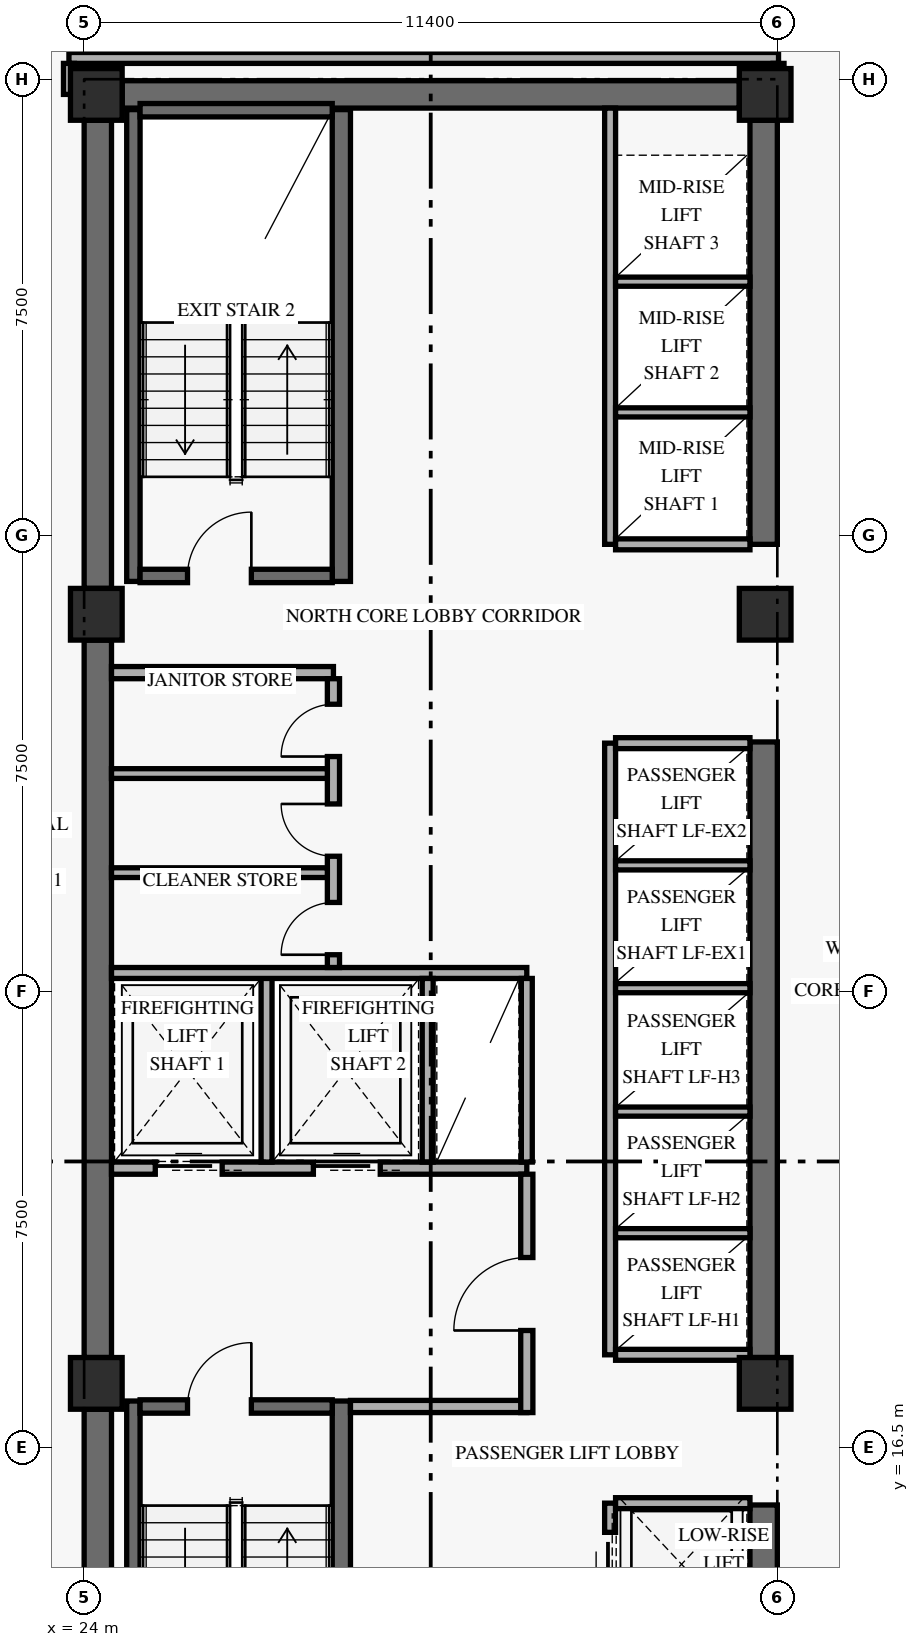
"""IFC4 building model, lengths in metres.
Left out: names, types, materials, properties, quantities, classifications, styles, units other than length and angle.
Written with IfcOpenShell. Run it as: python <this file> out.ifc"""

import sys

from ifc_helpers import new_model, si_unit, direction, frame, frame_2d, origin, origin_2d, place, context, subcontext, project, spatial, rectangle, extrude, element, fill, save


model = new_model("IFC4")
c1 = context("Model", 3, precision=1e-05, world=origin(), true_north=direction((0.0, 1.0)))
c2 = subcontext(c1, "Body", "Model", "MODEL_VIEW")
j1 = project(units=[si_unit("LENGTHUNIT", "METRE"), si_unit("PLANEANGLEUNIT", "RADIAN")], contexts=[c1])
p1 = place(None, origin())
s1 = spatial("IfcSite", under=j1, at=p1, CompositionType="ELEMENT")
p2 = place(p1, origin())
s2 = spatial("IfcBuilding", under=s1, at=p2, CompositionType="ELEMENT")
p3 = place(p2, frame((0.0, 0.0, 80.4)))
s3 = spatial("IfcBuildingStorey", under=s2, at=p3, CompositionType="ELEMENT", Elevation=80.4)
p4 = place(p3, frame((24.225, 9.675, 0.0), z_axis=(0.0, 0.0, 1.0), x_axis=(0.0, 1.0, 0.0)))
e1 = element("IfcWall", 1, at=p4, inside=s3, PredefinedType="SHEAR", context=c2, shape_type="SweptSolid", body=[
    extrude(rectangle(XDim=7.45, YDim=0.45, at=frame_2d((3.725, 0.0))), origin(), (0.0, 0.0, 1.0), 2.749),
])
p5 = place(p3, frame((24.225, 17.975, 0.0), z_axis=(0.0, 0.0, 1.0), x_axis=(0.0, 1.0, 0.0)))
e2 = element("IfcWall", 2, at=p5, inside=s3, PredefinedType="SHEAR", context=c2, shape_type="SweptSolid", body=[
    extrude(rectangle(XDim=11.8, YDim=0.45, at=frame_2d((5.9, 0.0))), origin(), (0.0, 0.0, 1.0), 2.749),
])
p6 = place(p3, frame((24.225, 30.625, 0.0), z_axis=(0.0, 0.0, 1.0), x_axis=(0.0, 1.0, 0.0)))
e3 = element("IfcWall", 3, at=p6, inside=s3, PredefinedType="SHEAR", context=c2, shape_type="SweptSolid", body=[
    extrude(rectangle(XDim=7.7, YDim=0.45, at=frame_2d((3.85, 0.0))), origin(), (0.0, 0.0, 1.0), 2.749),
])
p7 = place(p3, frame((35.175, 9.675, 0.0), z_axis=(0.0, 0.0, 1.0), x_axis=(0.0, 1.0, 0.0)))
e4 = element("IfcWall", 4, at=p7, inside=s3, PredefinedType="SHEAR", context=c2, shape_type="SweptSolid", body=[
    extrude(rectangle(XDim=5.875, YDim=0.45, at=frame_2d((2.938, 0.0))), origin(), (0.0, 0.0, 1.0), 2.749),
])
p8 = place(p3, frame((35.175, 17.975, 0.0), z_axis=(0.0, 0.0, 1.0), x_axis=(0.0, 1.0, 0.0)))
e5 = element("IfcWall", 5, at=p8, inside=s3, PredefinedType="SHEAR", context=c2, shape_type="SweptSolid", body=[
    extrude(rectangle(XDim=10.125, YDim=0.45, at=frame_2d((5.062, 0.0))), origin(), (0.0, 0.0, 1.0), 2.749),
])
p9 = place(p3, frame((35.175, 31.35, 0.0), z_axis=(0.0, 0.0, 1.0), x_axis=(0.0, 1.0, 0.0)))
e6 = element("IfcWall", 6, at=p9, inside=s3, PredefinedType="SHEAR", context=c2, shape_type="SweptSolid", body=[
    extrude(rectangle(XDim=6.975, YDim=0.45, at=frame_2d((3.487, 0.0))), origin(), (0.0, 0.0, 1.0), 2.749),
])
p10 = place(p3, frame((24.625, 38.75, 0.0), z_axis=(0.0, 0.0, 1.0), x_axis=(1.0, 0.0, 0.0)))
e7 = element("IfcWall", 7, at=p10, inside=s3, PredefinedType="SHEAR", context=c2, shape_type="SweptSolid", body=[
    extrude(rectangle(XDim=10.15, YDim=0.45, at=frame_2d((5.075, 0.0))), origin(), (0.0, 0.0, 1.0), 3.36),
])
p11 = place(p3, frame((24.81, 9.5, 0.0), z_axis=(0.0, 0.0, 1.0), x_axis=(0.0, 1.0, 0.0)))
e8 = element("IfcWall", 8, at=p11, inside=s3, PredefinedType="SHEAR", context=c2, shape_type="SweptSolid", body=[
    extrude(rectangle(XDim=7.76, YDim=0.22, at=frame_2d((3.88, 0.0))), origin(), (0.0, 0.0, 1.0), 3.36),
])
p12 = place(p3, frame((28.23, 9.5, 0.0), z_axis=(0.0, 0.0, 1.0), x_axis=(0.0, 1.0, 0.0)))
e9 = element("IfcWall", 9, at=p12, inside=s3, PredefinedType="SHEAR", context=c2, shape_type="SweptSolid", body=[
    extrude(rectangle(XDim=7.76, YDim=0.3, at=frame_2d((3.88, 0.0))), origin(), (0.0, 0.0, 1.0), 3.36),
])
p13 = place(p3, frame((24.92, 17.17, 0.0), z_axis=(0.0, 0.0, 1.0), x_axis=(1.0, 0.0, 0.0)))
e10 = element("IfcWall", 10, at=p13, inside=s3, PredefinedType="SHEAR", context=c2, shape_type="SweptSolid", body=[
    extrude(rectangle(XDim=3.16, YDim=0.22, at=frame_2d((1.58, 0.0))), origin(), (0.0, 0.0, 1.0), 3.36),
])
p14 = place(p13, frame((0.78, 0.0, 0.0)))
e11 = element("IfcOpeningElement", 11, at=p14, cuts=e10, PredefinedType="OPENING", context=c2, shape_type="SweptSolid", body=[
    extrude(rectangle(XDim=1.05, YDim=2.15, at=frame_2d((0.525, 1.075))), frame((0.0, 0.12, 0.0), z_axis=(0.0, -1.0, 0.0), x_axis=(1.0, 0.0, 0.0)), (0.0, 0.0, 1.0), 0.24),
])
p15 = place(p3, frame((24.81, 30.74, 0.0), z_axis=(0.0, 0.0, 1.0), x_axis=(0.0, 1.0, 0.0)))
e12 = element("IfcWall", 12, at=p15, inside=s3, PredefinedType="SHEAR", context=c2, shape_type="SweptSolid", body=[
    extrude(rectangle(XDim=7.76, YDim=0.22, at=frame_2d((3.88, 0.0))), origin(), (0.0, 0.0, 1.0), 3.36),
])
p16 = place(p3, frame((28.23, 30.74, 0.0), z_axis=(0.0, 0.0, 1.0), x_axis=(0.0, 1.0, 0.0)))
e13 = element("IfcWall", 13, at=p16, inside=s3, PredefinedType="SHEAR", context=c2, shape_type="SweptSolid", body=[
    extrude(rectangle(XDim=7.76, YDim=0.3, at=frame_2d((3.88, 0.0))), origin(), (0.0, 0.0, 1.0), 3.36),
])
p17 = place(p3, frame((24.92, 30.83, 0.0), z_axis=(0.0, 0.0, 1.0), x_axis=(1.0, 0.0, 0.0)))
e14 = element("IfcWall", 14, at=p17, inside=s3, PredefinedType="SHEAR", context=c2, shape_type="SweptSolid", body=[
    extrude(rectangle(XDim=3.16, YDim=0.22, at=frame_2d((1.58, 0.0))), origin(), (0.0, 0.0, 1.0), 3.36),
])
p18 = place(p17, frame((0.78, 0.0, 0.0)))
e15 = element("IfcOpeningElement", 15, at=p18, cuts=e14, PredefinedType="OPENING", context=c2, shape_type="SweptSolid", body=[
    extrude(rectangle(XDim=1.05, YDim=2.15, at=frame_2d((0.525, 1.075))), frame((0.0, 0.12, 0.0), z_axis=(0.0, -1.0, 0.0), x_axis=(1.0, 0.0, 0.0)), (0.0, 0.0, 1.0), 0.24),
])
p19 = place(p3, frame((24.92, 38.49, 0.0), z_axis=(0.0, 0.0, 1.0), x_axis=(1.0, 0.0, 0.0)))
e16 = element("IfcWall", 16, at=p19, inside=s3, PredefinedType="SHEAR", context=c2, shape_type="SweptSolid", body=[
    extrude(rectangle(XDim=3.16, YDim=0.22, at=frame_2d((1.58, 0.0))), origin(), (0.0, 0.0, 1.0), 3.36),
])
for number, where, z_axis, x_axis in (
    (17, (24.2, 17.55, 0.0), (0.0, 0.0, 1.0), (1.0, 0.0, 0.0)),
    (18, (24.2, 30.2, 0.0), (0.0, 0.0, 1.0), (1.0, 0.0, 0.0)),
    (19, (24.2, 38.75, 0.0), (0.0, 0.0, 1.0), (1.0, 0.0, 0.0)),
    (20, (35.2, 17.55, 0.0), (0.0, 0.0, 1.0), (1.0, 0.0, 0.0)),
    (21, (35.2, 30.2, 0.0), (0.0, 0.0, 1.0), (1.0, 0.0, 0.0)),
    (22, (35.2, 38.75, 0.0), (0.0, 0.0, 1.0), (1.0, 0.0, 0.0)),
):
    element("IfcColumn", number, at=place(p3, frame(where, z_axis=z_axis, x_axis=x_axis)), inside=s3, PredefinedType="COLUMN", context=c2, shape_type="SweptSolid", body=[
        extrude(rectangle(XDim=0.85, YDim=0.85, at=origin_2d()), origin(), (0.0, 0.0, 1.0), 3.6),
    ])
p20 = place(p3, frame((24.45, 21.09, 0.0), z_axis=(0.0, 0.0, 1.0), x_axis=(1.0, 0.0, 0.0)))
e23 = element("IfcWall", 23, at=p20, inside=s3, PredefinedType="STANDARD", context=c2, shape_type="SweptSolid", body=[
    extrude(rectangle(XDim=6.83, YDim=0.2, at=frame_2d((3.415, 0.0))), origin(), (0.0, 0.0, 1.0), 3.36),
])
p21 = place(p20, frame((0.72, 0.0, 0.0)))
e24 = element("IfcOpeningElement", 24, at=p21, cuts=e23, PredefinedType="OPENING", context=c2, shape_type="SweptSolid", body=[
    extrude(rectangle(XDim=1.1, YDim=2.2, at=frame_2d((0.55, 1.1))), frame((0.0, 0.11, 0.0), z_axis=(0.0, -1.0, 0.0), x_axis=(1.0, 0.0, 0.0)), (0.0, 0.0, 1.0), 0.22),
])
p22 = place(p20, frame((3.32, 0.0, 0.0)))
e25 = element("IfcOpeningElement", 25, at=p22, cuts=e23, PredefinedType="OPENING", context=c2, shape_type="SweptSolid", body=[
    extrude(rectangle(XDim=1.1, YDim=2.2, at=frame_2d((0.55, 1.1))), frame((0.0, 0.11, 0.0), z_axis=(0.0, -1.0, 0.0), x_axis=(1.0, 0.0, 0.0)), (0.0, 0.0, 1.0), 0.22),
])
p23 = place(p3, frame((28.38, 17.17, 0.0), z_axis=(0.0, 0.0, 1.0), x_axis=(1.0, 0.0, 0.0)))
e26 = element("IfcWall", 26, at=p23, inside=s3, PredefinedType="STANDARD", context=c2, shape_type="SweptSolid", body=[
    extrude(rectangle(XDim=2.9, YDim=0.2, at=frame_2d((1.45, 0.0))), origin(), (0.0, 0.0, 1.0), 3.36),
])
p24 = place(p3, frame((31.28, 17.07, 0.0), z_axis=(0.0, 0.0, 1.0), x_axis=(0.0, 1.0, 0.0)))
e27 = element("IfcWall", 27, at=p24, inside=s3, PredefinedType="STANDARD", context=c2, shape_type="SweptSolid", body=[
    extrude(rectangle(XDim=3.92, YDim=0.2, at=frame_2d((1.96, 0.0))), origin(), (0.0, 0.0, 1.0), 2.731),
])
p25 = place(p24, frame((1.35, 0.0, 0.0)))
e28 = element("IfcOpeningElement", 28, at=p25, cuts=e27, PredefinedType="OPENING", context=c2, shape_type="SweptSolid", body=[
    extrude(rectangle(XDim=1.2, YDim=2.15, at=frame_2d((0.6, 1.075))), frame((0.0, 0.11, 0.0), z_axis=(0.0, -1.0, 0.0), x_axis=(1.0, 0.0, 0.0)), (0.0, 0.0, 1.0), 0.22),
])
p26 = place(p3, frame((27.0, 21.19, 0.0), z_axis=(0.0, 0.0, 1.0), x_axis=(0.0, 1.0, 0.0)))
e29 = element("IfcWall", 29, at=p26, inside=s3, PredefinedType="STANDARD", context=c2, shape_type="SweptSolid", body=[
    extrude(rectangle(XDim=3.11, YDim=0.18, at=frame_2d((1.555, 0.0))), origin(), (0.0, 0.0, 1.0), 3.36),
])
p27 = place(p3, frame((24.45, 24.3, 0.0), z_axis=(0.0, 0.0, 1.0), x_axis=(1.0, 0.0, 0.0)))
e30 = element("IfcWall", 30, at=p27, inside=s3, PredefinedType="STANDARD", context=c2, shape_type="SweptSolid", body=[
    extrude(rectangle(XDim=6.83, YDim=0.18, at=frame_2d((3.415, 0.0))), origin(), (0.0, 0.0, 1.0), 3.36),
])
for number, where, z_axis, x_axis in (
    (31, (29.65, 21.19, 0.0), (0.0, 0.0, 1.0), (0.0, 1.0, 0.0)),
    (32, (31.28, 21.19, 0.0), (0.0, 0.0, 1.0), (0.0, 1.0, 0.0)),
):
    element("IfcWall", number, at=place(p3, frame(where, z_axis=z_axis, x_axis=x_axis)), inside=s3, PredefinedType="STANDARD", context=c2, shape_type="SweptSolid", body=[
        extrude(rectangle(XDim=3.02, YDim=0.18, at=frame_2d((1.51, 0.0))), origin(), (0.0, 0.0, 1.0), 3.36),
    ])
p28 = place(p3, frame((24.45, 29.24, 0.0), z_axis=(0.0, 0.0, 1.0), x_axis=(1.0, 0.0, 0.0)))
e33 = element("IfcWall", 33, at=p28, inside=s3, PredefinedType="STANDARD", context=c2, shape_type="SweptSolid", body=[
    extrude(rectangle(XDim=3.65, YDim=0.2, at=frame_2d((1.825, 0.0))), origin(), (0.0, 0.0, 1.0), 3.36),
])
p29 = place(p3, frame((28.1, 24.39, 0.0), z_axis=(0.0, 0.0, 1.0), x_axis=(0.0, 1.0, 0.0)))
e34 = element("IfcWall", 34, at=p29, inside=s3, PredefinedType="STANDARD", context=c2, shape_type="SweptSolid", body=[
    extrude(rectangle(XDim=4.75, YDim=0.2, at=frame_2d((2.375, 0.0))), origin(), (0.0, 0.0, 1.0), 3.36),
])
p30 = place(p29, frame((0.21, 0.0, 0.0)))
e35 = element("IfcOpeningElement", 35, at=p30, cuts=e34, PredefinedType="OPENING", context=c2, shape_type="SweptSolid", body=[
    extrude(rectangle(XDim=0.86, YDim=2.1, at=frame_2d((0.43, 1.05))), frame((0.0, 0.11, 0.0), z_axis=(0.0, -1.0, 0.0), x_axis=(1.0, 0.0, 0.0)), (0.0, 0.0, 1.0), 0.22),
])
p31 = place(p29, frame((1.83, 0.0, 0.0)))
e36 = element("IfcOpeningElement", 36, at=p31, cuts=e34, PredefinedType="OPENING", context=c2, shape_type="SweptSolid", body=[
    extrude(rectangle(XDim=0.86, YDim=2.1, at=frame_2d((0.43, 1.05))), frame((0.0, 0.11, 0.0), z_axis=(0.0, -1.0, 0.0), x_axis=(1.0, 0.0, 0.0)), (0.0, 0.0, 1.0), 0.22),
])
p32 = place(p29, frame((3.47, 0.0, 0.0)))
e37 = element("IfcOpeningElement", 37, at=p32, cuts=e34, PredefinedType="OPENING", context=c2, shape_type="SweptSolid", body=[
    extrude(rectangle(XDim=0.86, YDim=2.1, at=frame_2d((0.43, 1.05))), frame((0.0, 0.11, 0.0), z_axis=(0.0, -1.0, 0.0), x_axis=(1.0, 0.0, 0.0)), (0.0, 0.0, 1.0), 0.22),
])
for number, where, z_axis, x_axis in (
    (38, (24.45, 25.95, 0.0), (0.0, 0.0, 1.0), (1.0, 0.0, 0.0)),
    (39, (24.45, 27.58, 0.0), (0.0, 0.0, 1.0), (1.0, 0.0, 0.0)),
):
    element("IfcWall", number, at=place(p3, frame(where, z_axis=z_axis, x_axis=x_axis)), inside=s3, PredefinedType="PARTITIONING", context=c2, shape_type="SweptSolid", body=[
        extrude(rectangle(XDim=3.55, YDim=0.16, at=frame_2d((1.775, 0.0))), origin(), (0.0, 0.0, 1.0), 3.36),
    ])
p33 = place(p3, frame((32.65, 9.5, 0.0), z_axis=(0.0, 0.0, 1.0), x_axis=(0.0, 1.0, 0.0)))
e40 = element("IfcWall", 40, at=p33, inside=s3, PredefinedType="STANDARD", context=c2, shape_type="SweptSolid", body=[
    extrude(rectangle(XDim=6.08, YDim=0.18, at=frame_2d((3.04, 0.0))), origin(), (0.0, 0.0, 1.0), 3.36),
])
p34 = place(p33, frame((0.55, 0.0, 0.0)))
e41 = element("IfcOpeningElement", 41, at=p34, cuts=e40, PredefinedType="OPENING", context=c2, shape_type="SweptSolid", body=[
    extrude(rectangle(XDim=1.05, YDim=2.2, at=frame_2d((0.525, 1.1))), frame((0.0, 0.1, 0.0), z_axis=(0.0, -1.0, 0.0), x_axis=(1.0, 0.0, 0.0)), (0.0, 0.0, 1.0), 0.2),
])
p35 = place(p33, frame((2.55, 0.0, 0.0)))
e42 = element("IfcOpeningElement", 42, at=p35, cuts=e40, PredefinedType="OPENING", context=c2, shape_type="SweptSolid", body=[
    extrude(rectangle(XDim=1.05, YDim=2.2, at=frame_2d((0.525, 1.1))), frame((0.0, 0.1, 0.0), z_axis=(0.0, -1.0, 0.0), x_axis=(1.0, 0.0, 0.0)), (0.0, 0.0, 1.0), 0.2),
])
p36 = place(p33, frame((4.55, 0.0, 0.0)))
e43 = element("IfcOpeningElement", 43, at=p36, cuts=e40, PredefinedType="OPENING", context=c2, shape_type="SweptSolid", body=[
    extrude(rectangle(XDim=1.05, YDim=2.2, at=frame_2d((0.525, 1.1))), frame((0.0, 0.1, 0.0), z_axis=(0.0, -1.0, 0.0), x_axis=(1.0, 0.0, 0.0)), (0.0, 0.0, 1.0), 0.2),
])
p37 = place(p3, frame((32.74, 15.58, 0.0), z_axis=(0.0, 0.0, 1.0), x_axis=(1.0, 0.0, 0.0)))
e44 = element("IfcWall", 44, at=p37, inside=s3, PredefinedType="STANDARD", context=c2, shape_type="SweptSolid", body=[
    extrude(rectangle(XDim=2.21, YDim=0.18, at=frame_2d((1.105, 0.0))), origin(), (0.0, 0.0, 1.0), 3.36),
])
p38 = place(p3, frame((32.65, 18.02, 0.0), z_axis=(0.0, 0.0, 1.0), x_axis=(0.0, 1.0, 0.0)))
e45 = element("IfcWall", 45, at=p38, inside=s3, PredefinedType="STANDARD", context=c2, shape_type="SweptSolid", body=[
    extrude(rectangle(XDim=10.06, YDim=0.18, at=frame_2d((5.03, 0.0))), origin(), (0.0, 0.0, 1.0), 3.36),
])
for number, where, z_axis, x_axis in (
    (46, (32.74, 18.02, 0.0), (0.0, 0.0, 1.0), (1.0, 0.0, 0.0)),
    (47, (32.74, 28.08, 0.0), (0.0, 0.0, 1.0), (1.0, 0.0, 0.0)),
):
    element("IfcWall", number, at=place(p3, frame(where, z_axis=z_axis, x_axis=x_axis)), inside=s3, PredefinedType="STANDARD", context=c2, shape_type="SweptSolid", body=[
        extrude(rectangle(XDim=2.21, YDim=0.18, at=frame_2d((1.105, 0.0))), origin(), (0.0, 0.0, 1.0), 3.36),
    ])
for number, where, z_axis, x_axis in (
    (48, (32.74, 20.02, 0.0), (0.0, 0.0, 1.0), (1.0, 0.0, 0.0)),
    (49, (32.74, 22.02, 0.0), (0.0, 0.0, 1.0), (1.0, 0.0, 0.0)),
    (50, (32.74, 24.05, 0.0), (0.0, 0.0, 1.0), (1.0, 0.0, 0.0)),
    (51, (32.74, 26.07, 0.0), (0.0, 0.0, 1.0), (1.0, 0.0, 0.0)),
):
    element("IfcWall", number, at=place(p3, frame(where, z_axis=z_axis, x_axis=x_axis)), inside=s3, PredefinedType="STANDARD", context=c2, shape_type="SweptSolid", body=[
        extrude(rectangle(XDim=2.21, YDim=0.15, at=frame_2d((1.105, 0.0))), origin(), (0.0, 0.0, 1.0), 3.36),
    ])
p39 = place(p3, frame((32.65, 31.35, 0.0), z_axis=(0.0, 0.0, 1.0), x_axis=(0.0, 1.0, 0.0)))
e52 = element("IfcWall", 52, at=p39, inside=s3, PredefinedType="STANDARD", context=c2, shape_type="SweptSolid", body=[
    extrude(rectangle(XDim=7.175, YDim=0.18, at=frame_2d((3.587, 0.0))), origin(), (0.0, 0.0, 1.0), 3.36),
])
p40 = place(p3, frame((32.74, 31.35, 0.0), z_axis=(0.0, 0.0, 1.0), x_axis=(1.0, 0.0, 0.0)))
e53 = element("IfcWall", 53, at=p40, inside=s3, PredefinedType="STANDARD", context=c2, shape_type="SweptSolid", body=[
    extrude(rectangle(XDim=2.21, YDim=0.18, at=frame_2d((1.105, 0.0))), origin(), (0.0, 0.0, 1.0), 3.36),
])
for number, where, z_axis, x_axis in (
    (54, (32.74, 33.52, 0.0), (0.0, 0.0, 1.0), (1.0, 0.0, 0.0)),
    (55, (32.74, 35.67, 0.0), (0.0, 0.0, 1.0), (1.0, 0.0, 0.0)),
):
    element("IfcWall", number, at=place(p3, frame(where, z_axis=z_axis, x_axis=x_axis)), inside=s3, PredefinedType="STANDARD", context=c2, shape_type="SweptSolid", body=[
        extrude(rectangle(XDim=2.21, YDim=0.15, at=frame_2d((1.105, 0.0))), origin(), (0.0, 0.0, 1.0), 3.36),
    ])
p41 = place(p3, frame((23.75, 39.35, 0.0), z_axis=(0.0, 0.0, 1.0), x_axis=(1.0, 0.0, 0.0)))
e56 = element("IfcWall", 56, at=p41, inside=s3, PredefinedType="STANDARD", context=c2, shape_type="SweptSolid", body=[
    extrude(rectangle(XDim=11.67, YDim=0.18, at=frame_2d((5.835, 0.0))), origin(), (0.0, 0.0, 1.0), 2.731),
])
for number, where, z_axis, x_axis in (
    (57, (35.42, 38.75, 0.0), (0.0, 0.0, 1.0), (0.0, 1.0, 0.0)),
    (58, (23.75, 38.75, 0.0), (0.0, 0.0, 1.0), (0.0, 1.0, 0.0)),
):
    element("IfcWall", number, at=place(p3, frame(where, z_axis=z_axis, x_axis=x_axis)), inside=s3, PredefinedType="STANDARD", context=c2, shape_type="SweptSolid", body=[
        extrude(rectangle(XDim=0.51, YDim=0.18, at=frame_2d((0.255, 0.0))), origin(), (0.0, 0.0, 1.0), 2.731),
    ])
p42 = place(p14, frame((1.05, 0.0, 0.0), z_axis=(0.0, 0.0, 1.0), x_axis=(-1.0, 0.0, 0.0)))
e59 = element("IfcDoor", 59, at=p42, inside=s3, OperationType="SINGLE_SWING_LEFT", PredefinedType="DOOR", context=c2, shape_type="SweptSolid", body=[
    extrude(rectangle(XDim=1.05, YDim=2.15, at=frame_2d((0.525, 1.075))), frame((0.0, 0.025, 0.0), z_axis=(0.0, -1.0, 0.0), x_axis=(1.0, 0.0, 0.0)), (0.0, 0.0, 1.0), 0.05),
])
fill(e11, e59)
p43 = place(p18, origin())
e60 = element("IfcDoor", 60, at=p43, inside=s3, OperationType="SINGLE_SWING_RIGHT", PredefinedType="DOOR", context=c2, shape_type="SweptSolid", body=[
    extrude(rectangle(XDim=1.05, YDim=2.15, at=frame_2d((0.525, 1.075))), frame((0.0, 0.025, 0.0), z_axis=(0.0, -1.0, 0.0), x_axis=(1.0, 0.0, 0.0)), (0.0, 0.0, 1.0), 0.05),
])
fill(e15, e60)
p44 = place(p21, origin())
e61 = element("IfcDoor", 61, at=p44, inside=s3, OperationType="SLIDING_TO_LEFT", PredefinedType="DOOR", context=c2, shape_type="SweptSolid", body=[
    extrude(rectangle(XDim=1.1, YDim=2.2, at=frame_2d((0.55, 1.1))), frame((0.0, 0.025, 0.0), z_axis=(0.0, -1.0, 0.0), x_axis=(1.0, 0.0, 0.0)), (0.0, 0.0, 1.0), 0.05),
])
fill(e24, e61)
p45 = place(p22, origin())
e62 = element("IfcDoor", 62, at=p45, inside=s3, OperationType="SLIDING_TO_LEFT", PredefinedType="DOOR", context=c2, shape_type="SweptSolid", body=[
    extrude(rectangle(XDim=1.1, YDim=2.2, at=frame_2d((0.55, 1.1))), frame((0.0, 0.025, 0.0), z_axis=(0.0, -1.0, 0.0), x_axis=(1.0, 0.0, 0.0)), (0.0, 0.0, 1.0), 0.05),
])
fill(e25, e62)
p46 = place(p25, origin())
e63 = element("IfcDoor", 63, at=p46, inside=s3, OperationType="SINGLE_SWING_LEFT", PredefinedType="DOOR", context=c2, shape_type="SweptSolid", body=[
    extrude(rectangle(XDim=1.2, YDim=2.15, at=frame_2d((0.6, 1.075))), frame((0.0, 0.025, 0.0), z_axis=(0.0, -1.0, 0.0), x_axis=(1.0, 0.0, 0.0)), (0.0, 0.0, 1.0), 0.05),
])
fill(e28, e63)
p47 = place(p30, origin())
e64 = element("IfcDoor", 64, at=p47, inside=s3, OperationType="SINGLE_SWING_LEFT", PredefinedType="DOOR", context=c2, shape_type="SweptSolid", body=[
    extrude(rectangle(XDim=0.86, YDim=2.1, at=frame_2d((0.43, 1.05))), frame((0.0, 0.025, 0.0), z_axis=(0.0, -1.0, 0.0), x_axis=(1.0, 0.0, 0.0)), (0.0, 0.0, 1.0), 0.05),
])
fill(e35, e64)
p48 = place(p31, origin())
e65 = element("IfcDoor", 65, at=p48, inside=s3, OperationType="SINGLE_SWING_RIGHT", PredefinedType="DOOR", context=c2, shape_type="SweptSolid", body=[
    extrude(rectangle(XDim=0.86, YDim=2.1, at=frame_2d((0.43, 1.05))), frame((0.0, 0.025, 0.0), z_axis=(0.0, -1.0, 0.0), x_axis=(1.0, 0.0, 0.0)), (0.0, 0.0, 1.0), 0.05),
])
fill(e36, e65)
p49 = place(p32, origin())
e66 = element("IfcDoor", 66, at=p49, inside=s3, OperationType="SINGLE_SWING_LEFT", PredefinedType="DOOR", context=c2, shape_type="SweptSolid", body=[
    extrude(rectangle(XDim=0.86, YDim=2.1, at=frame_2d((0.43, 1.05))), frame((0.0, 0.025, 0.0), z_axis=(0.0, -1.0, 0.0), x_axis=(1.0, 0.0, 0.0)), (0.0, 0.0, 1.0), 0.05),
])
fill(e37, e66)
p50 = place(p36, origin())
e67 = element("IfcDoor", 67, at=p50, inside=s3, OperationType="SLIDING_TO_LEFT", PredefinedType="DOOR", context=c2, shape_type="SweptSolid", body=[
    extrude(rectangle(XDim=1.05, YDim=2.2, at=frame_2d((0.525, 1.1))), frame((0.0, 0.025, 0.0), z_axis=(0.0, -1.0, 0.0), x_axis=(1.0, 0.0, 0.0)), (0.0, 0.0, 1.0), 0.05),
])
fill(e43, e67)
save(model, sys.argv[1])
